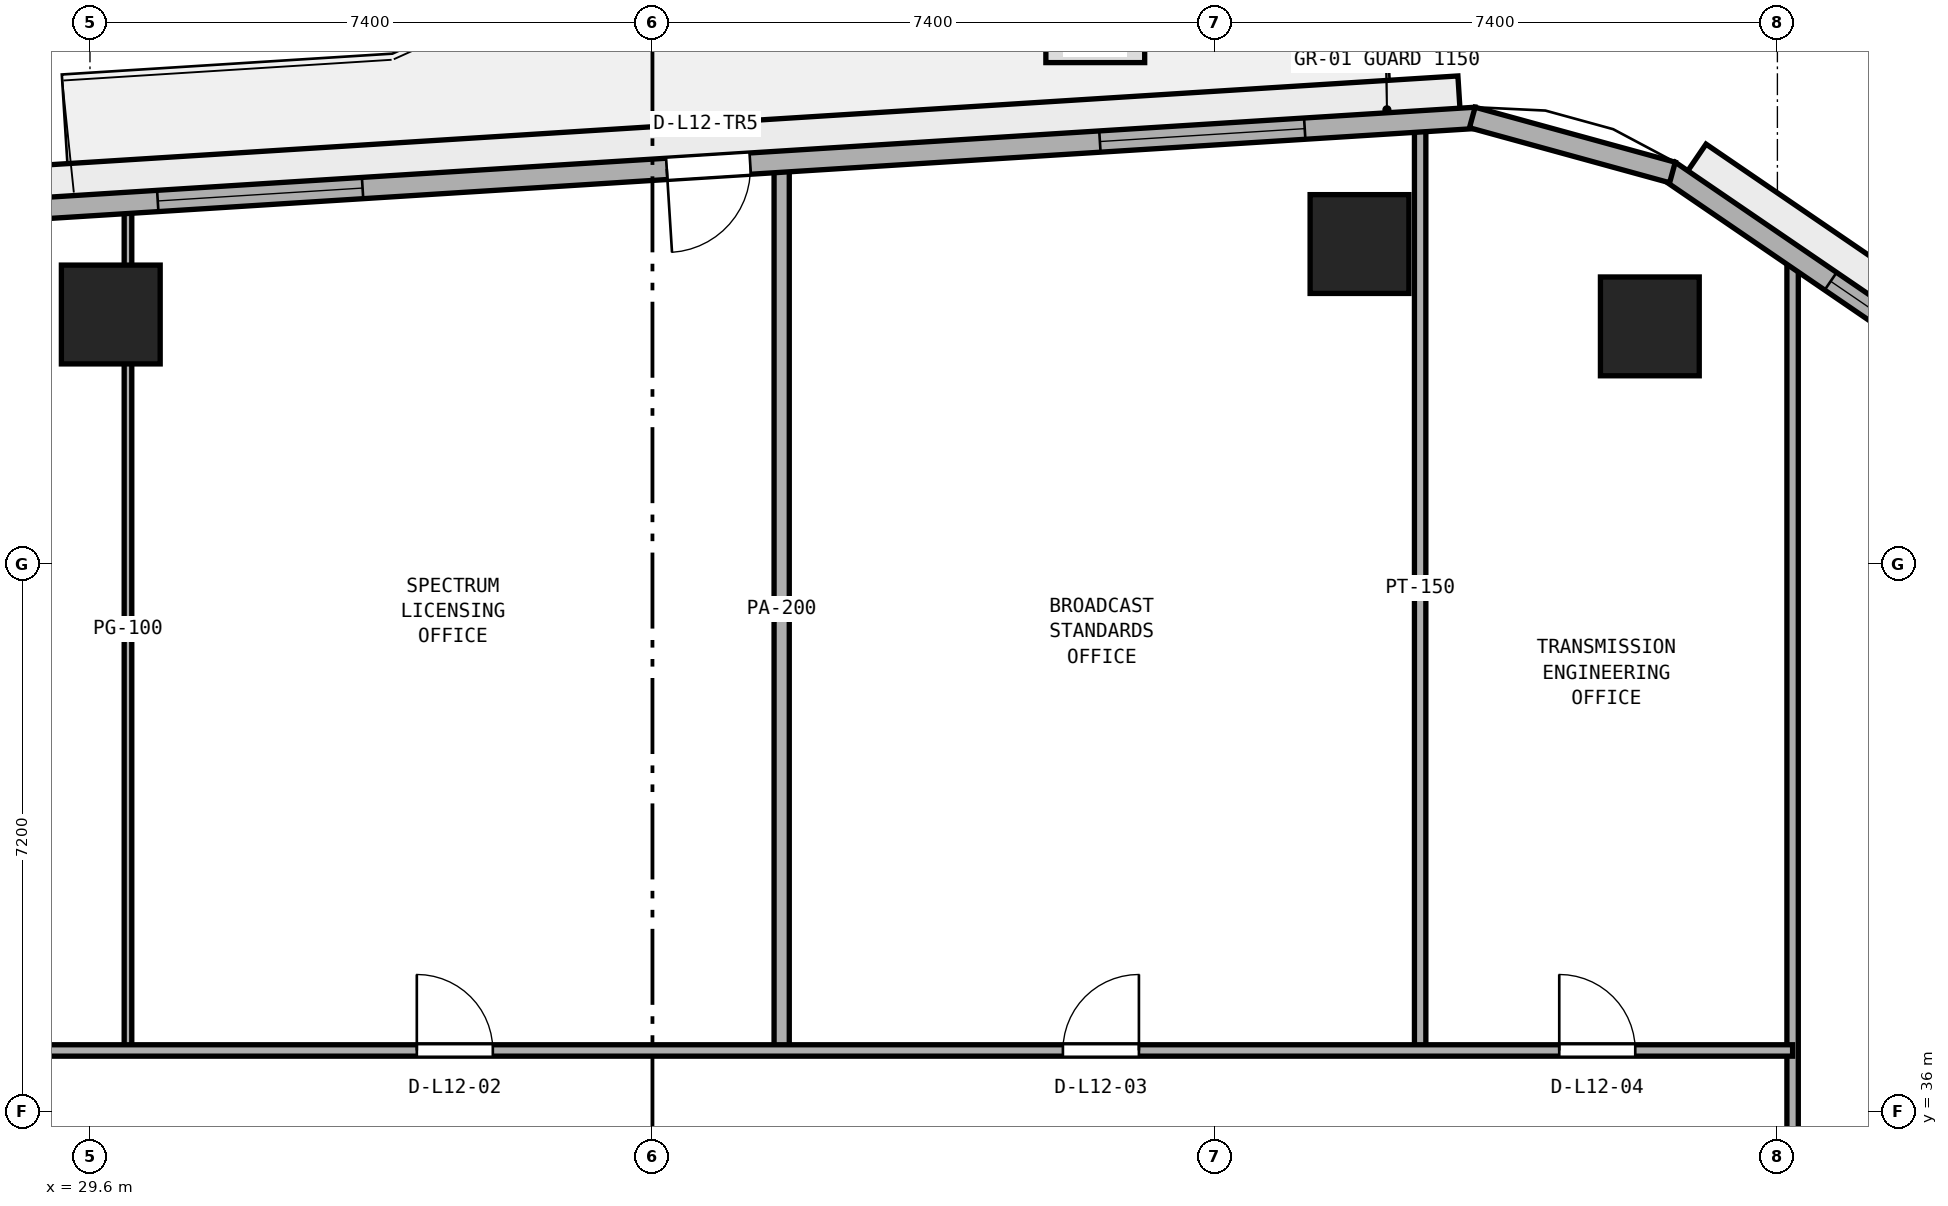
"""IFC4 building model, lengths in metres.
Left out: names, types, materials, properties, quantities, classifications, styles, units other than length and angle.
Written with IfcOpenShell. Run it as: python <this file> out.ifc"""

import sys

from ifc_helpers import new_model, si_unit, direction, frame, frame_2d, origin, origin_2d, place, context, subcontext, project, spatial, rectangle, extrude, element, fill, save


model = new_model("IFC4")
c1 = context("Model", 3, precision=1e-05, world=origin(), true_north=direction((0.0, 1.0)))
c2 = subcontext(c1, "Body", "Model", "MODEL_VIEW")
j1 = project(units=[si_unit("LENGTHUNIT", "METRE"), si_unit("PLANEANGLEUNIT", "RADIAN")], contexts=[c1])
p1 = place(None, origin())
s1 = spatial("IfcSite", under=j1, at=p1, CompositionType="ELEMENT")
p2 = place(p1, origin())
s2 = spatial("IfcBuilding", under=s1, at=p2, CompositionType="ELEMENT")
p3 = place(p2, frame((0.0, 0.0, 51.6)))
s3 = spatial("IfcBuildingStorey", under=s2, at=p3, CompositionType="ELEMENT", Elevation=51.6)
for number, where, z_axis, x_axis in (
    (1, (50.122, 46.326, 0.0), (0.0, 0.0, 1.0), (1.0, 0.0, 0.0)),
    (2, (46.302, 47.409, 0.0), (0.0, 0.0, 1.0), (1.0, 0.0, 0.0)),
    (3, (29.874, 46.482, 0.0), (0.0, 0.0, 1.0), (1.0, 0.0, 0.0)),
):
    element("IfcColumn", number, at=place(p3, frame(where, z_axis=z_axis, x_axis=x_axis)), inside=s3, PredefinedType="COLUMN", context=c2, shape_type="SweptSolid", body=[
        extrude(rectangle(XDim=1.3, YDim=1.3, at=origin_2d()), origin(), (0.0, 0.0, 1.0), 3.8),
    ])
p4 = place(p3, frame((52.0, 13.6, 0.0), z_axis=(0.0, 0.0, 1.0), x_axis=(0.0, 1.0, 0.0)))
e4 = element("IfcWall", 4, at=p4, inside=s3, PredefinedType="PARTITIONING", context=c2, shape_type="SweptSolid", body=[
    extrude(rectangle(XDim=33.691, YDim=0.15, at=frame_2d((16.846, 0.0))), origin(), (0.0, 0.0, 1.0), 3.525),
])
p5 = place(p4, frame((6.075, 0.0, 0.0)))
e5 = element("IfcOpeningElement", 5, at=p5, cuts=e4, PredefinedType="OPENING", context=c2, shape_type="SweptSolid", body=[
    extrude(rectangle(XDim=1.0, YDim=2.12, at=frame_2d((0.5, 1.06))), frame((0.0, 0.085, 0.0), z_axis=(0.0, -1.0, 0.0), x_axis=(1.0, 0.0, 0.0)), (0.0, 0.0, 1.0), 0.17),
])
p6 = place(p4, frame((12.6, 0.0, 0.0)))
e6 = element("IfcOpeningElement", 6, at=p6, cuts=e4, PredefinedType="OPENING", context=c2, shape_type="SweptSolid", body=[
    extrude(rectangle(XDim=1.0, YDim=2.12, at=frame_2d((0.5, 1.06))), frame((0.0, 0.085, 0.0), z_axis=(0.0, -1.0, 0.0), x_axis=(1.0, 0.0, 0.0)), (0.0, 0.0, 1.0), 0.17),
])
p7 = place(p4, frame((19.35, 0.0, 0.0)))
e7 = element("IfcOpeningElement", 7, at=p7, cuts=e4, PredefinedType="OPENING", context=c2, shape_type="SweptSolid", body=[
    extrude(rectangle(XDim=1.0, YDim=2.12, at=frame_2d((0.5, 1.06))), frame((0.0, 0.085, 0.0), z_axis=(0.0, -1.0, 0.0), x_axis=(1.0, 0.0, 0.0)), (0.0, 0.0, 1.0), 0.17),
])
p8 = place(p3, frame((47.1, 36.8, 0.0), z_axis=(0.0, 0.0, 1.0), x_axis=(0.0, 1.0, 0.0)))
e8 = element("IfcWall", 8, at=p8, inside=s3, PredefinedType="PARTITIONING", context=c2, shape_type="SweptSolid", body=[
    extrude(rectangle(XDim=12.158, YDim=0.15, at=frame_2d((6.079, 0.0))), origin(), (0.0, 0.0, 1.0), 3.525),
])
p9 = place(p3, frame((38.7, 36.8, 0.0), z_axis=(0.0, 0.0, 1.0), x_axis=(0.0, 1.0, 0.0)))
e9 = element("IfcWall", 9, at=p9, inside=s3, PredefinedType="PARTITIONING", context=c2, shape_type="SweptSolid", body=[
    extrude(rectangle(XDim=11.629, YDim=0.2, at=frame_2d((5.814, 0.0))), origin(), (0.0, 0.0, 1.0), 3.525),
])
p10 = place(p3, frame((30.1, 36.8, 0.0), z_axis=(0.0, 0.0, 1.0), x_axis=(0.0, 1.0, 0.0)))
e10 = element("IfcWall", 10, at=p10, inside=s3, PredefinedType="PARTITIONING", context=c2, shape_type="SweptSolid", body=[
    extrude(rectangle(XDim=11.086, YDim=0.1, at=frame_2d((5.543, 0.0))), origin(), (0.0, 0.0, 1.0), 3.525),
])
p11 = place(p3, frame((22.0, 36.8, 0.0), z_axis=(0.0, 0.0, 1.0), x_axis=(1.0, 0.0, 0.0)))
e11 = element("IfcWall", 11, at=p11, inside=s3, PredefinedType="PARTITIONING", context=c2, shape_type="SweptSolid", body=[
    extrude(rectangle(XDim=30.0, YDim=0.15, at=frame_2d((15.0, 0.0))), origin(), (0.0, 0.0, 1.0), 3.525),
])
p12 = place(p11, frame((3.67, 0.0, 0.0)))
e12 = element("IfcOpeningElement", 12, at=p12, cuts=e11, PredefinedType="OPENING", context=c2, shape_type="SweptSolid", body=[
    extrude(rectangle(XDim=1.0, YDim=2.12, at=frame_2d((0.5, 1.06))), frame((0.0, 0.085, 0.0), z_axis=(0.0, -1.0, 0.0), x_axis=(1.0, 0.0, 0.0)), (0.0, 0.0, 1.0), 0.17),
])
p13 = place(p11, frame((11.9, 0.0, 0.0)))
e13 = element("IfcOpeningElement", 13, at=p13, cuts=e11, PredefinedType="OPENING", context=c2, shape_type="SweptSolid", body=[
    extrude(rectangle(XDim=1.0, YDim=2.12, at=frame_2d((0.5, 1.06))), frame((0.0, 0.085, 0.0), z_axis=(0.0, -1.0, 0.0), x_axis=(1.0, 0.0, 0.0)), (0.0, 0.0, 1.0), 0.17),
])
p14 = place(p11, frame((20.4, 0.0, 0.0)))
e14 = element("IfcOpeningElement", 14, at=p14, cuts=e11, PredefinedType="OPENING", context=c2, shape_type="SweptSolid", body=[
    extrude(rectangle(XDim=1.0, YDim=2.12, at=frame_2d((0.5, 1.06))), frame((0.0, 0.085, 0.0), z_axis=(0.0, -1.0, 0.0), x_axis=(1.0, 0.0, 0.0)), (0.0, 0.0, 1.0), 0.17),
])
p15 = place(p11, frame((26.93, 0.0, 0.0)))
e15 = element("IfcOpeningElement", 15, at=p15, cuts=e11, PredefinedType="OPENING", context=c2, shape_type="SweptSolid", body=[
    extrude(rectangle(XDim=1.0, YDim=2.12, at=frame_2d((0.5, 1.06))), frame((0.0, 0.085, 0.0), z_axis=(0.0, -1.0, 0.0), x_axis=(1.0, 0.0, 0.0)), (0.0, 0.0, 1.0), 0.17),
])
p16 = place(p3, frame((64.29, 38.867, 0.0), z_axis=(0.0, 0.0, 1.0), x_axis=(-0.825755550159, 0.564028165416, 0.0)))
e16 = element("IfcWall", 16, at=p16, inside=s3, PredefinedType="STANDARD", context=c2, shape_type="SweptSolid", body=[
    extrude(rectangle(XDim=16.848, YDim=0.28, at=frame_2d((8.424, 0.0))), origin(), (0.0, 0.0, 1.0), 3.525),
])
p17 = place(p16, frame((1.792, 0.0, 0.9)))
e17 = element("IfcOpeningElement", 17, at=p17, cuts=e16, PredefinedType="OPENING", context=c2, shape_type="SweptSolid", body=[
    extrude(rectangle(XDim=2.7, YDim=1.75, at=frame_2d((1.35, 0.875))), frame((0.0, 0.15, 0.0), z_axis=(0.0, -1.0, 0.0), x_axis=(1.0, 0.0, 0.0)), (0.0, 0.0, 1.0), 0.3),
])
p18 = place(p16, frame((7.074, 0.0, 0.9)))
e18 = element("IfcOpeningElement", 18, at=p18, cuts=e16, PredefinedType="OPENING", context=c2, shape_type="SweptSolid", body=[
    extrude(rectangle(XDim=2.7, YDim=1.75, at=frame_2d((1.35, 0.875))), frame((0.0, 0.15, 0.0), z_axis=(0.0, -1.0, 0.0), x_axis=(1.0, 0.0, 0.0)), (0.0, 0.0, 1.0), 0.3),
])
p19 = place(p16, frame((11.577, 0.0, 0.9)))
e19 = element("IfcOpeningElement", 19, at=p19, cuts=e16, PredefinedType="OPENING", context=c2, shape_type="SweptSolid", body=[
    extrude(rectangle(XDim=2.7, YDim=1.75, at=frame_2d((1.35, 0.875))), frame((0.0, 0.15, 0.0), z_axis=(0.0, -1.0, 0.0), x_axis=(1.0, 0.0, 0.0)), (0.0, 0.0, 1.0), 0.3),
])
p20 = place(p3, frame((47.832, 49.069, 0.0), z_axis=(0.0, 0.0, 1.0), x_axis=(-0.998017725054, -0.062933460723, 0.0)))
e20 = element("IfcWall", 20, at=p20, inside=s3, PredefinedType="STANDARD", context=c2, shape_type="SweptSolid", body=[
    extrude(rectangle(XDim=19.629, YDim=0.28, at=frame_2d((9.815, 0.0))), origin(), (0.0, 0.0, 1.0), 3.525),
])
p21 = place(p20, frame((9.565, 0.0, 0.0)))
e21 = element("IfcOpeningElement", 21, at=p21, cuts=e20, PredefinedType="OPENING", context=c2, shape_type="SweptSolid", body=[
    extrude(rectangle(XDim=1.1, YDim=2.2, at=frame_2d((0.55, 1.1))), frame((0.0, 0.15, 0.0), z_axis=(0.0, -1.0, 0.0), x_axis=(1.0, 0.0, 0.0)), (0.0, 0.0, 1.0), 0.3),
])
p22 = place(p20, frame((2.255, 0.0, 0.9)))
e22 = element("IfcOpeningElement", 22, at=p22, cuts=e20, PredefinedType="OPENING", context=c2, shape_type="SweptSolid", body=[
    extrude(rectangle(XDim=2.7, YDim=1.75, at=frame_2d((1.35, 0.875))), frame((0.0, 0.15, 0.0), z_axis=(0.0, -1.0, 0.0), x_axis=(1.0, 0.0, 0.0)), (0.0, 0.0, 1.0), 0.3),
])
p23 = place(p20, frame((14.675, 0.0, 0.9)))
e23 = element("IfcOpeningElement", 23, at=p23, cuts=e20, PredefinedType="OPENING", context=c2, shape_type="SweptSolid", body=[
    extrude(rectangle(XDim=2.7, YDim=1.75, at=frame_2d((1.35, 0.875))), frame((0.0, 0.15, 0.0), z_axis=(0.0, -1.0, 0.0), x_axis=(1.0, 0.0, 0.0)), (0.0, 0.0, 1.0), 0.3),
])
p24 = place(p3, frame((50.419, 48.351, 0.0), z_axis=(0.0, 0.0, 1.0), x_axis=(-0.964254516967, 0.264977784933, 0.0)))
e24 = element("IfcWall", 24, at=p24, inside=s3, PredefinedType="STANDARD", context=c2, shape_type="SweptSolid", body=[
    extrude(rectangle(XDim=2.731, YDim=0.28, at=frame_2d((1.365, 0.0))), origin(), (0.0, 0.0, 1.0), 3.525),
])
p25 = place(p13, origin())
e25 = element("IfcDoor", 25, at=p25, inside=s3, OperationType="SINGLE_SWING_LEFT", PredefinedType="DOOR", context=c2, shape_type="SweptSolid", body=[
    extrude(rectangle(XDim=1.0, YDim=2.12, at=frame_2d((0.5, 1.06))), frame((0.0, 0.025, 0.0), z_axis=(0.0, -1.0, 0.0), x_axis=(1.0, 0.0, 0.0)), (0.0, 0.0, 1.0), 0.05),
])
fill(e13, e25)
p26 = place(p14, origin())
e26 = element("IfcDoor", 26, at=p26, inside=s3, OperationType="SINGLE_SWING_RIGHT", PredefinedType="DOOR", context=c2, shape_type="SweptSolid", body=[
    extrude(rectangle(XDim=1.0, YDim=2.12, at=frame_2d((0.5, 1.06))), frame((0.0, 0.025, 0.0), z_axis=(0.0, -1.0, 0.0), x_axis=(1.0, 0.0, 0.0)), (0.0, 0.0, 1.0), 0.05),
])
fill(e14, e26)
p27 = place(p15, origin())
e27 = element("IfcDoor", 27, at=p27, inside=s3, OperationType="SINGLE_SWING_LEFT", PredefinedType="DOOR", context=c2, shape_type="SweptSolid", body=[
    extrude(rectangle(XDim=1.0, YDim=2.12, at=frame_2d((0.5, 1.06))), frame((0.0, 0.025, 0.0), z_axis=(0.0, -1.0, 0.0), x_axis=(1.0, 0.0, 0.0)), (0.0, 0.0, 1.0), 0.05),
])
fill(e15, e27)
p28 = place(p19, origin())
e28 = element("IfcWindow", 28, at=p28, inside=s3, PartitioningType="SINGLE_PANEL", PredefinedType="WINDOW", context=c2, shape_type="SweptSolid", body=[
    extrude(rectangle(XDim=2.7, YDim=1.75, at=frame_2d((1.35, 0.875))), frame((0.0, 0.03, 0.0), z_axis=(0.0, -1.0, 0.0), x_axis=(1.0, 0.0, 0.0)), (0.0, 0.0, 1.0), 0.06),
])
fill(e19, e28)
p29 = place(p21, origin())
e29 = element("IfcDoor", 29, at=p29, inside=s3, OperationType="SINGLE_SWING_RIGHT", PredefinedType="DOOR", context=c2, shape_type="SweptSolid", body=[
    extrude(rectangle(XDim=1.1, YDim=2.2, at=frame_2d((0.55, 1.1))), frame((0.0, 0.025, 0.0), z_axis=(0.0, -1.0, 0.0), x_axis=(1.0, 0.0, 0.0)), (0.0, 0.0, 1.0), 0.05),
])
fill(e21, e29)
p30 = place(p22, origin())
e30 = element("IfcWindow", 30, at=p30, inside=s3, PartitioningType="SINGLE_PANEL", PredefinedType="WINDOW", context=c2, shape_type="SweptSolid", body=[
    extrude(rectangle(XDim=2.7, YDim=1.75, at=frame_2d((1.35, 0.875))), frame((0.0, 0.03, 0.0), z_axis=(0.0, -1.0, 0.0), x_axis=(1.0, 0.0, 0.0)), (0.0, 0.0, 1.0), 0.06),
])
fill(e22, e30)
p31 = place(p23, origin())
e31 = element("IfcWindow", 31, at=p31, inside=s3, PartitioningType="SINGLE_PANEL", PredefinedType="WINDOW", context=c2, shape_type="SweptSolid", body=[
    extrude(rectangle(XDim=2.7, YDim=1.75, at=frame_2d((1.35, 0.875))), frame((0.0, 0.03, 0.0), z_axis=(0.0, -1.0, 0.0), x_axis=(1.0, 0.0, 0.0)), (0.0, 0.0, 1.0), 0.06),
])
fill(e23, e31)
save(model, sys.argv[1])
